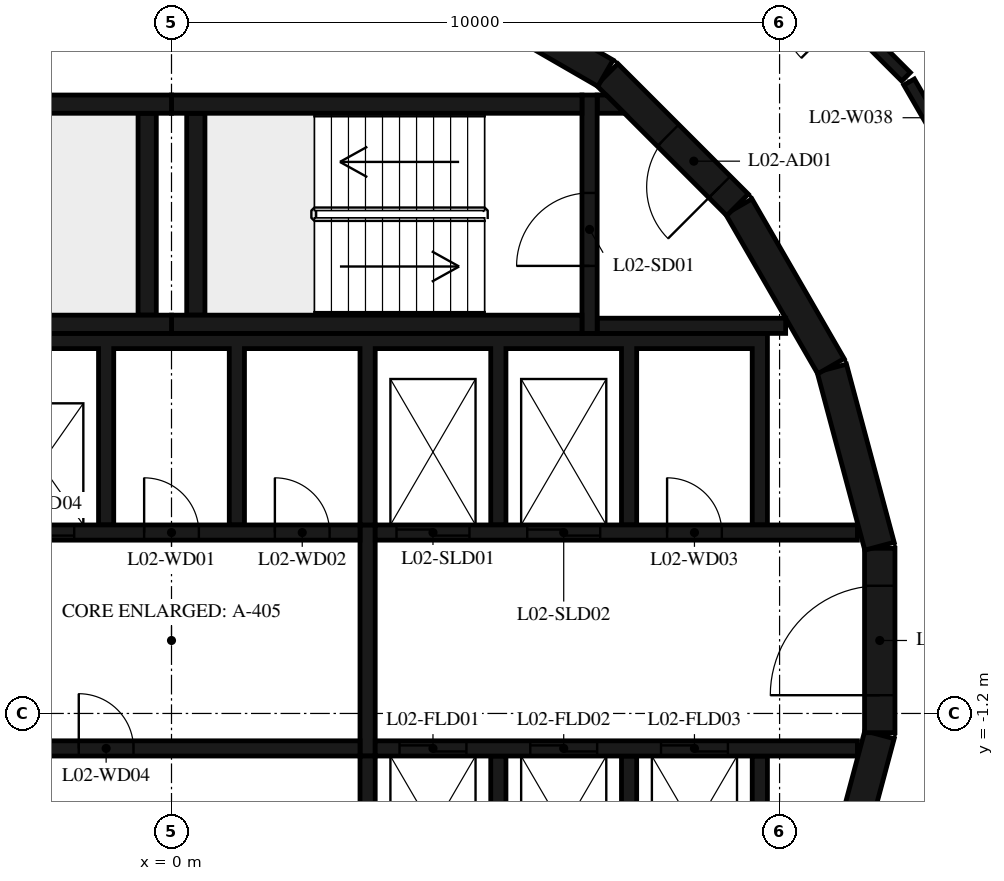
"""IFC4 building model, lengths in metres.
Left out: names, types, materials, properties, quantities, classifications, styles, units other than length and angle.
Written with IfcOpenShell. Run it as: python <this file> out.ifc"""

import sys

from ifc_helpers import new_model, si_unit, direction, frame, frame_2d, origin, place, context, subcontext, project, spatial, polyline, rectangle, outline, extrude, element, fill, save


model = new_model("IFC4")
c1 = context("Model", 3, precision=1e-05, world=origin(), true_north=direction((0.0, 1.0)))
c2 = subcontext(c1, "Body", "Model", "MODEL_VIEW")
j1 = project(units=[si_unit("LENGTHUNIT", "METRE"), si_unit("PLANEANGLEUNIT", "RADIAN")], contexts=[c1])
p1 = place(None, origin())
s1 = spatial("IfcSite", under=j1, at=p1, CompositionType="ELEMENT")
p2 = place(p1, origin())
s2 = spatial("IfcBuilding", under=s1, at=p2, CompositionType="ELEMENT")
p3 = place(p2, frame((0.0, 0.0, 13.8)))
s3 = spatial("IfcBuildingStorey", under=s2, at=p3, CompositionType="ELEMENT", Elevation=13.8)
p4 = place(p3, frame((10.858, -4.479, 0.0), z_axis=(0.0, 0.0, 1.0), x_axis=(0.258734743916, 0.965948410781, 0.0)))
e1 = element("IfcWall", 1, at=p4, inside=s3, PredefinedType="SHEAR", context=c2, shape_type="SweptSolid", body=[
    extrude(rectangle(XDim=3.033, YDim=0.5, at=frame_2d((1.516, 0.0))), origin(), (0.0, 0.0, 1.0), 4.42),
])
p5 = place(p3, frame((11.647, -1.516, 0.0), z_axis=(0.0, 0.0, 1.0), x_axis=(0.0, 1.0, 0.0)))
e2 = element("IfcWall", 2, at=p5, inside=s3, PredefinedType="SHEAR", context=c2, shape_type="SweptSolid", body=[
    extrude(rectangle(XDim=3.033, YDim=0.5, at=frame_2d((1.516, 0.0))), origin(), (0.0, 0.0, 1.0), 4.42),
])
p6 = place(p5, frame((0.616, 0.0, 0.0)))
e3 = element("IfcOpeningElement", 3, at=p6, cuts=e2, PredefinedType="OPENING", context=c2, shape_type="SweptSolid", body=[
    extrude(rectangle(XDim=1.8, YDim=2.1, at=frame_2d((0.9, 1.05))), frame((0.0, 0.26, 0.0), z_axis=(0.0, -1.0, 0.0), x_axis=(1.0, 0.0, 0.0)), (0.0, 0.0, 1.0), 0.52),
])
for number, where, z_axis, x_axis in (
    (4, (11.643, 1.55, 0.0), (0.0, 0.0, 1.0), (-0.259, 0.966, 0.0)),
    (5, (10.845, 4.51, 0.0), (0.0, 0.0, 1.0), (-0.5, 0.866, 0.0)),
):
    element("IfcWall", number, at=place(p3, frame(where, z_axis=z_axis, x_axis=x_axis)), inside=s3, PredefinedType="SHEAR", context=c2, shape_type="SweptSolid", body=[
        extrude(rectangle(XDim=3.033, YDim=0.5, at=frame_2d((1.516, 0.0))), origin(), (0.0, 0.0, 1.0), 4.42),
    ])
p7 = place(p3, frame((9.308, 7.164, 0.0), z_axis=(0.0, 0.0, 1.0), x_axis=(-0.707106781187, 0.707106781187, 0.0)))
e6 = element("IfcWall", 6, at=p7, inside=s3, PredefinedType="SHEAR", context=c2, shape_type="SweptSolid", body=[
    extrude(rectangle(XDim=3.032, YDim=0.5, at=frame_2d((1.516, 0.0))), origin(), (0.0, 0.0, 1.0), 4.42),
])
p8 = place(p7, frame((0.416, 0.0, 0.0)))
e7 = element("IfcOpeningElement", 7, at=p8, cuts=e6, PredefinedType="OPENING", context=c2, shape_type="SweptSolid", body=[
    extrude(rectangle(XDim=1.2, YDim=2.1, at=frame_2d((0.6, 1.05))), frame((0.0, 0.26, 0.0), z_axis=(0.0, -1.0, 0.0), x_axis=(1.0, 0.0, 0.0)), (0.0, 0.0, 1.0), 0.52),
])
p9 = place(p3, frame((7.137, 9.329, 0.0), z_axis=(0.0, 0.0, 1.0), x_axis=(-0.865975092491, 0.500087131594, 0.0)))
e8 = element("IfcWall", 8, at=p9, inside=s3, PredefinedType="SHEAR", context=c2, shape_type="SweptSolid", body=[
    extrude(rectangle(XDim=3.033, YDim=0.5, at=frame_2d((1.516, 0.0))), origin(), (0.0, 0.0, 1.0), 4.42),
])
for number, where, z_axis, x_axis in (
    (9, (0.0, 5.2, 0.0), (0.0, 0.0, 1.0), (1.0, 0.0, 0.0)),
    (10, (0.0, 8.82, 0.0), (0.0, 0.0, 1.0), (1.0, 0.0, 0.0)),
):
    element("IfcWall", number, at=place(p3, frame(where, z_axis=z_axis, x_axis=x_axis)), inside=s3, PredefinedType="SHEAR", context=c2, shape_type="SweptSolid", body=[
        extrude(rectangle(XDim=6.75, YDim=0.3, at=frame_2d((3.375, 0.0))), origin(), (0.0, 0.0, 1.0), 4.42),
    ])
p10 = place(p3, frame((0.4, 5.35, 0.0), z_axis=(0.0, 0.0, 1.0), x_axis=(0.0, 1.0, 0.0)))
e11 = element("IfcWall", 11, at=p10, inside=s3, PredefinedType="SHEAR", context=c2, shape_type="SweptSolid", body=[
    extrude(rectangle(XDim=3.32, YDim=0.3, at=frame_2d((1.66, 0.0))), origin(), (0.0, 0.0, 1.0), 4.42),
])
p11 = place(p3, frame((6.875, 5.05, 0.0), z_axis=(0.0, 0.0, 1.0), x_axis=(0.0, 1.0, 0.0)))
e12 = element("IfcWall", 12, at=p11, inside=s3, PredefinedType="SHEAR", context=c2, shape_type="SweptSolid", body=[
    extrude(rectangle(XDim=3.92, YDim=0.25, at=frame_2d((1.96, 0.0))), origin(), (0.0, 0.0, 1.0), 4.42),
])
p12 = place(p11, frame((1.11, 0.0, 0.0)))
e13 = element("IfcOpeningElement", 13, at=p12, cuts=e12, PredefinedType="OPENING", context=c2, shape_type="SweptSolid", body=[
    extrude(rectangle(XDim=1.2, YDim=2.1, at=frame_2d((0.6, 1.05))), frame((0.0, 0.135, 0.0), z_axis=(0.0, -1.0, 0.0), x_axis=(1.0, 0.0, 0.0)), (0.0, 0.0, 1.0), 0.27),
])
p13 = place(p3, frame((7.0, 5.175, 0.0), z_axis=(0.0, 0.0, 1.0), x_axis=(1.0, 0.0, 0.0)))
e14 = element("IfcWall", 14, at=p13, inside=s3, PredefinedType="SHEAR", context=c2, shape_type="SweptSolid", body=[
    extrude(rectangle(XDim=3.1, YDim=0.25, at=frame_2d((1.55, 0.0))), origin(), (0.0, 0.0, 1.0), 4.42),
])
p14 = place(p3, origin())
e15 = element("IfcWall", 15, at=p14, inside=s3, PredefinedType="SHEAR", context=c2, shape_type="SweptSolid", body=[
    extrude(outline(polyline([(7.448, 8.67), (7.0, 8.67), (7.0, 8.97), (7.148, 8.97), (7.448, 8.67)])), origin(), (0.0, 0.0, 1.0), 4.42),
])
for number, where, z_axis, x_axis in (
    (16, (-6.75, 5.2, 0.0), (0.0, 0.0, 1.0), (1.0, 0.0, 0.0)),
    (17, (-6.75, 8.82, 0.0), (0.0, 0.0, 1.0), (1.0, 0.0, 0.0)),
):
    element("IfcWall", number, at=place(p3, frame(where, z_axis=z_axis, x_axis=x_axis)), inside=s3, PredefinedType="SHEAR", context=c2, shape_type="SweptSolid", body=[
        extrude(rectangle(XDim=6.75, YDim=0.3, at=frame_2d((3.375, 0.0))), origin(), (0.0, 0.0, 1.0), 4.42),
    ])
p15 = place(p3, frame((-0.4, 5.35, 0.0), z_axis=(0.0, 0.0, 1.0), x_axis=(0.0, 1.0, 0.0)))
e18 = element("IfcWall", 18, at=p15, inside=s3, PredefinedType="SHEAR", context=c2, shape_type="SweptSolid", body=[
    extrude(rectangle(XDim=3.32, YDim=0.3, at=frame_2d((1.66, 0.0))), origin(), (0.0, 0.0, 1.0), 4.42),
])
p16 = place(p3, origin())
e19 = element("IfcWall", 19, at=p16, inside=s3, PredefinedType="SHEAR", context=c2, shape_type="SweptSolid", body=[
    extrude(outline(polyline([(-9.55, 4.8), (-7.65, 4.8), (-7.65, 1.9), (-7.4, 1.9), (-7.4, 4.8), (-5.5, 4.8), (-5.5, 1.9), (-5.25, 1.9), (-5.25, 4.8), (-3.35, 4.8), (-3.35, 1.9), (-3.1, 1.9), (-3.1, 4.8), (-1.2, 4.8), (-1.2, 1.9), (-0.95, 1.9), (-0.95, 4.8), (0.95, 4.8), (0.95, 1.9), (1.2, 1.9), (1.2, 4.8), (3.1, 4.8), (3.1, 1.9), (3.35, 1.9), (3.35, 4.8), (5.25, 4.8), (5.25, 1.9), (5.5, 1.9), (5.5, 4.8), (7.4, 4.8), (7.4, 1.9), (7.65, 1.9), (7.65, 4.8), (9.55, 4.8), (9.55, 1.9), (9.8, 1.9), (9.8, 4.8), (9.8, 5.05), (-9.8, 5.05), (-9.8, 4.8), (-9.8, 1.9), (-9.55, 1.9), (-9.55, 4.8)])), origin(), (0.0, 0.0, 1.0), 4.42),
])
p17 = place(p3, origin())
e20 = element("IfcWall", 20, at=p17, inside=s3, PredefinedType="SHEAR", context=c2, shape_type="SweptSolid", body=[
    extrude(outline(polyline([(9.8, -5.05), (9.8, -4.8), (9.8, -1.9), (9.55, -1.9), (9.55, -4.8), (7.65, -4.8), (7.65, -1.9), (7.4, -1.9), (7.4, -4.8), (5.5, -4.8), (5.5, -1.9), (5.25, -1.9), (5.25, -4.8), (3.35, -4.8), (3.35, -1.9), (3.1, -1.9), (3.1, -4.8), (-5.25, -4.8), (-5.25, -1.9), (-5.5, -1.9), (-5.5, -4.8), (-7.4, -4.8), (-7.4, -1.9), (-7.65, -1.9), (-7.65, -4.8), (-9.55, -4.8), (-9.55, -1.9), (-9.8, -1.9), (-9.8, -4.8), (-9.8, -5.05), (9.8, -5.05)])), origin(), (0.0, 0.0, 1.0), 4.42),
])
p18 = place(p3, frame((-11.28, 1.775, 0.0), z_axis=(0.0, 0.0, 1.0), x_axis=(1.0, 0.0, 0.0)))
e21 = element("IfcWall", 21, at=p18, inside=s3, PredefinedType="SHEAR", context=c2, shape_type="SweptSolid", body=[
    extrude(rectangle(XDim=14.38, YDim=0.25, at=frame_2d((7.19, 0.0))), origin(), (0.0, 0.0, 1.0), 4.42),
])
p19 = place(p18, frame((2.13, 0.0, 0.0)))
e22 = element("IfcOpeningElement", 22, at=p19, cuts=e21, PredefinedType="OPENING", context=c2, shape_type="SweptSolid", body=[
    extrude(rectangle(XDim=1.1, YDim=2.1, at=frame_2d((0.55, 1.05))), frame((0.0, 0.135, 0.0), z_axis=(0.0, -1.0, 0.0), x_axis=(1.0, 0.0, 0.0)), (0.0, 0.0, 1.0), 0.27),
])
p20 = place(p18, frame((4.28, 0.0, 0.0)))
e23 = element("IfcOpeningElement", 23, at=p20, cuts=e21, PredefinedType="OPENING", context=c2, shape_type="SweptSolid", body=[
    extrude(rectangle(XDim=1.1, YDim=2.1, at=frame_2d((0.55, 1.05))), frame((0.0, 0.135, 0.0), z_axis=(0.0, -1.0, 0.0), x_axis=(1.0, 0.0, 0.0)), (0.0, 0.0, 1.0), 0.27),
])
p21 = place(p18, frame((6.43, 0.0, 0.0)))
e24 = element("IfcOpeningElement", 24, at=p21, cuts=e21, PredefinedType="OPENING", context=c2, shape_type="SweptSolid", body=[
    extrude(rectangle(XDim=1.1, YDim=2.1, at=frame_2d((0.55, 1.05))), frame((0.0, 0.135, 0.0), z_axis=(0.0, -1.0, 0.0), x_axis=(1.0, 0.0, 0.0)), (0.0, 0.0, 1.0), 0.27),
])
p22 = place(p18, frame((8.58, 0.0, 0.0)))
e25 = element("IfcOpeningElement", 25, at=p22, cuts=e21, PredefinedType="OPENING", context=c2, shape_type="SweptSolid", body=[
    extrude(rectangle(XDim=1.1, YDim=2.1, at=frame_2d((0.55, 1.05))), frame((0.0, 0.135, 0.0), z_axis=(0.0, -1.0, 0.0), x_axis=(1.0, 0.0, 0.0)), (0.0, 0.0, 1.0), 0.27),
])
p23 = place(p18, frame((10.83, 0.0, 0.0)))
e26 = element("IfcOpeningElement", 26, at=p23, cuts=e21, PredefinedType="OPENING", context=c2, shape_type="SweptSolid", body=[
    extrude(rectangle(XDim=0.9, YDim=2.1, at=frame_2d((0.45, 1.05))), frame((0.0, 0.135, 0.0), z_axis=(0.0, -1.0, 0.0), x_axis=(1.0, 0.0, 0.0)), (0.0, 0.0, 1.0), 0.27),
])
p24 = place(p18, frame((12.98, 0.0, 0.0)))
e27 = element("IfcOpeningElement", 27, at=p24, cuts=e21, PredefinedType="OPENING", context=c2, shape_type="SweptSolid", body=[
    extrude(rectangle(XDim=0.9, YDim=2.1, at=frame_2d((0.45, 1.05))), frame((0.0, 0.135, 0.0), z_axis=(0.0, -1.0, 0.0), x_axis=(1.0, 0.0, 0.0)), (0.0, 0.0, 1.0), 0.27),
])
p25 = place(p3, frame((3.35, 1.775, 0.0), z_axis=(0.0, 0.0, 1.0), x_axis=(1.0, 0.0, 0.0)))
e28 = element("IfcWall", 28, at=p25, inside=s3, PredefinedType="SHEAR", context=c2, shape_type="SweptSolid", body=[
    extrude(rectangle(XDim=7.93, YDim=0.25, at=frame_2d((3.965, 0.0))), origin(), (0.0, 0.0, 1.0), 4.42),
])
p26 = place(p25, frame((0.35, 0.0, 0.0)))
e29 = element("IfcOpeningElement", 29, at=p26, cuts=e28, PredefinedType="OPENING", context=c2, shape_type="SweptSolid", body=[
    extrude(rectangle(XDim=1.2, YDim=2.4, at=frame_2d((0.6, 1.2))), frame((0.0, 0.135, 0.0), z_axis=(0.0, -1.0, 0.0), x_axis=(1.0, 0.0, 0.0)), (0.0, 0.0, 1.0), 0.27),
])
p27 = place(p25, frame((2.5, 0.0, 0.0)))
e30 = element("IfcOpeningElement", 30, at=p27, cuts=e28, PredefinedType="OPENING", context=c2, shape_type="SweptSolid", body=[
    extrude(rectangle(XDim=1.2, YDim=2.4, at=frame_2d((0.6, 1.2))), frame((0.0, 0.135, 0.0), z_axis=(0.0, -1.0, 0.0), x_axis=(1.0, 0.0, 0.0)), (0.0, 0.0, 1.0), 0.27),
])
p28 = place(p25, frame((4.8, 0.0, 0.0)))
e31 = element("IfcOpeningElement", 31, at=p28, cuts=e28, PredefinedType="OPENING", context=c2, shape_type="SweptSolid", body=[
    extrude(rectangle(XDim=0.9, YDim=2.1, at=frame_2d((0.45, 1.05))), frame((0.0, 0.135, 0.0), z_axis=(0.0, -1.0, 0.0), x_axis=(1.0, 0.0, 0.0)), (0.0, 0.0, 1.0), 0.27),
])
p29 = place(p3, frame((-11.28, -1.775, 0.0), z_axis=(0.0, 0.0, 1.0), x_axis=(1.0, 0.0, 0.0)))
e32 = element("IfcWall", 32, at=p29, inside=s3, PredefinedType="SHEAR", context=c2, shape_type="SweptSolid", body=[
    extrude(rectangle(XDim=14.38, YDim=0.25, at=frame_2d((7.19, 0.0))), origin(), (0.0, 0.0, 1.0), 4.42),
])
p30 = place(p29, frame((9.755, 0.0, 0.0)))
e33 = element("IfcOpeningElement", 33, at=p30, cuts=e32, PredefinedType="OPENING", context=c2, shape_type="SweptSolid", body=[
    extrude(rectangle(XDim=0.9, YDim=2.1, at=frame_2d((0.45, 1.05))), frame((0.0, 0.135, 0.0), z_axis=(0.0, -1.0, 0.0), x_axis=(1.0, 0.0, 0.0)), (0.0, 0.0, 1.0), 0.27),
])
p31 = place(p3, frame((3.35, -1.775, 0.0), z_axis=(0.0, 0.0, 1.0), x_axis=(1.0, 0.0, 0.0)))
e34 = element("IfcWall", 34, at=p31, inside=s3, PredefinedType="SHEAR", context=c2, shape_type="SweptSolid", body=[
    extrude(rectangle(XDim=7.93, YDim=0.25, at=frame_2d((3.965, 0.0))), origin(), (0.0, 0.0, 1.0), 4.42),
])
p32 = place(p31, frame((0.4, 0.0, 0.0)))
e35 = element("IfcOpeningElement", 35, at=p32, cuts=e34, PredefinedType="OPENING", context=c2, shape_type="SweptSolid", body=[
    extrude(rectangle(XDim=1.1, YDim=2.4, at=frame_2d((0.55, 1.2))), frame((0.0, 0.135, 0.0), z_axis=(0.0, -1.0, 0.0), x_axis=(1.0, 0.0, 0.0)), (0.0, 0.0, 1.0), 0.27),
])
p33 = place(p31, frame((2.55, 0.0, 0.0)))
e36 = element("IfcOpeningElement", 36, at=p33, cuts=e34, PredefinedType="OPENING", context=c2, shape_type="SweptSolid", body=[
    extrude(rectangle(XDim=1.1, YDim=2.4, at=frame_2d((0.55, 1.2))), frame((0.0, 0.135, 0.0), z_axis=(0.0, -1.0, 0.0), x_axis=(1.0, 0.0, 0.0)), (0.0, 0.0, 1.0), 0.27),
])
p34 = place(p31, frame((4.7, 0.0, 0.0)))
e37 = element("IfcOpeningElement", 37, at=p34, cuts=e34, PredefinedType="OPENING", context=c2, shape_type="SweptSolid", body=[
    extrude(rectangle(XDim=1.1, YDim=2.4, at=frame_2d((0.55, 1.2))), frame((0.0, 0.135, 0.0), z_axis=(0.0, -1.0, 0.0), x_axis=(1.0, 0.0, 0.0)), (0.0, 0.0, 1.0), 0.27),
])
p35 = place(p3, frame((3.225, -1.9, 0.0), z_axis=(0.0, 0.0, 1.0), x_axis=(0.0, 1.0, 0.0)))
e38 = element("IfcWall", 38, at=p35, inside=s3, PredefinedType="SHEAR", context=c2, shape_type="SweptSolid", body=[
    extrude(rectangle(XDim=3.8, YDim=0.25, at=frame_2d((1.9, 0.0))), origin(), (0.0, 0.0, 1.0), 4.42),
])
p36 = place(p3, frame((12.08, 9.27, 0.0), z_axis=(0.0, 0.0, 1.0), x_axis=(-0.707106781187, 0.707106781187, 0.0)))
e39 = element("IfcWall", 39, at=p36, inside=s3, PredefinedType="PARTITIONING", context=c2, shape_type="SweptSolid", body=[
    extrude(rectangle(XDim=3.874, YDim=0.2, at=frame_2d((1.937, 0.0))), origin(), (0.0, 0.0, 1.0), 4.42),
])
p37 = place(p36, frame((1.437, 0.0, 0.0)))
e40 = element("IfcOpeningElement", 40, at=p37, cuts=e39, PredefinedType="OPENING", context=c2, shape_type="SweptSolid", body=[
    extrude(rectangle(XDim=1.0, YDim=2.1, at=frame_2d((0.5, 1.05))), frame((0.0, 0.11, 0.0), z_axis=(0.0, -1.0, 0.0), x_axis=(1.0, 0.0, 0.0)), (0.0, 0.0, 1.0), 0.22),
])
p38 = place(p3, frame((12.81, 8.01, 0.0), z_axis=(0.0, 0.0, 1.0), x_axis=(-0.501305875941, 0.865270142064, 0.0)))
e41 = element("IfcWall", 41, at=p38, inside=s3, PredefinedType="PARTITIONING", context=c2, shape_type="SweptSolid", body=[
    extrude(rectangle(XDim=1.356, YDim=0.2, at=frame_2d((0.678, 0.0))), origin(), (0.0, 0.0, 1.0), 4.42),
])
p39 = place(p12, origin())
e42 = element("IfcDoor", 42, at=p39, inside=s3, OperationType="SINGLE_SWING_LEFT", PredefinedType="DOOR", context=c2, shape_type="SweptSolid", body=[
    extrude(rectangle(XDim=1.2, YDim=2.1, at=frame_2d((0.6, 1.05))), frame((0.0, 0.025, 0.0), z_axis=(0.0, -1.0, 0.0), x_axis=(1.0, 0.0, 0.0)), (0.0, 0.0, 1.0), 0.05),
])
fill(e13, e42)
p40 = place(p8, origin())
e43 = element("IfcDoor", 43, at=p40, inside=s3, OperationType="SINGLE_SWING_RIGHT", PredefinedType="DOOR", context=c2, shape_type="SweptSolid", body=[
    extrude(rectangle(XDim=1.2, YDim=2.1, at=frame_2d((0.6, 1.05))), frame((0.0, 0.025, 0.0), z_axis=(0.0, -1.0, 0.0), x_axis=(1.0, 0.0, 0.0)), (0.0, 0.0, 1.0), 0.05),
])
fill(e7, e43)
p41 = place(p6, origin())
e44 = element("IfcDoor", 44, at=p41, inside=s3, OperationType="DOUBLE_DOOR_SINGLE_SWING", PredefinedType="DOOR", context=c2, shape_type="SweptSolid", body=[
    extrude(rectangle(XDim=1.8, YDim=2.1, at=frame_2d((0.9, 1.05))), frame((0.0, 0.025, 0.0), z_axis=(0.0, -1.0, 0.0), x_axis=(1.0, 0.0, 0.0)), (0.0, 0.0, 1.0), 0.05),
])
fill(e3, e44)
p42 = place(p22, origin())
e45 = element("IfcDoor", 45, at=p42, inside=s3, OperationType="DOUBLE_DOOR_SLIDING", PredefinedType="DOOR", context=c2, shape_type="SweptSolid", body=[
    extrude(rectangle(XDim=1.1, YDim=2.1, at=frame_2d((0.55, 1.05))), frame((0.0, 0.025, 0.0), z_axis=(0.0, -1.0, 0.0), x_axis=(1.0, 0.0, 0.0)), (0.0, 0.0, 1.0), 0.05),
])
fill(e25, e45)
p43 = place(p26, origin())
e46 = element("IfcDoor", 46, at=p43, inside=s3, OperationType="DOUBLE_DOOR_SLIDING", PredefinedType="DOOR", context=c2, shape_type="SweptSolid", body=[
    extrude(rectangle(XDim=1.2, YDim=2.4, at=frame_2d((0.6, 1.2))), frame((0.0, 0.025, 0.0), z_axis=(0.0, -1.0, 0.0), x_axis=(1.0, 0.0, 0.0)), (0.0, 0.0, 1.0), 0.05),
])
fill(e29, e46)
p44 = place(p27, origin())
e47 = element("IfcDoor", 47, at=p44, inside=s3, OperationType="DOUBLE_DOOR_SLIDING", PredefinedType="DOOR", context=c2, shape_type="SweptSolid", body=[
    extrude(rectangle(XDim=1.2, YDim=2.4, at=frame_2d((0.6, 1.2))), frame((0.0, 0.025, 0.0), z_axis=(0.0, -1.0, 0.0), x_axis=(1.0, 0.0, 0.0)), (0.0, 0.0, 1.0), 0.05),
])
fill(e30, e47)
p45 = place(p32, origin())
e48 = element("IfcDoor", 48, at=p45, inside=s3, OperationType="DOUBLE_DOOR_SLIDING", PredefinedType="DOOR", context=c2, shape_type="SweptSolid", body=[
    extrude(rectangle(XDim=1.1, YDim=2.4, at=frame_2d((0.55, 1.2))), frame((0.0, 0.025, 0.0), z_axis=(0.0, -1.0, 0.0), x_axis=(1.0, 0.0, 0.0)), (0.0, 0.0, 1.0), 0.05),
])
fill(e35, e48)
p46 = place(p33, origin())
e49 = element("IfcDoor", 49, at=p46, inside=s3, OperationType="DOUBLE_DOOR_SLIDING", PredefinedType="DOOR", context=c2, shape_type="SweptSolid", body=[
    extrude(rectangle(XDim=1.1, YDim=2.4, at=frame_2d((0.55, 1.2))), frame((0.0, 0.025, 0.0), z_axis=(0.0, -1.0, 0.0), x_axis=(1.0, 0.0, 0.0)), (0.0, 0.0, 1.0), 0.05),
])
fill(e36, e49)
p47 = place(p34, origin())
e50 = element("IfcDoor", 50, at=p47, inside=s3, OperationType="DOUBLE_DOOR_SLIDING", PredefinedType="DOOR", context=c2, shape_type="SweptSolid", body=[
    extrude(rectangle(XDim=1.1, YDim=2.4, at=frame_2d((0.55, 1.2))), frame((0.0, 0.025, 0.0), z_axis=(0.0, -1.0, 0.0), x_axis=(1.0, 0.0, 0.0)), (0.0, 0.0, 1.0), 0.05),
])
fill(e37, e50)
p48 = place(p23, origin())
e51 = element("IfcDoor", 51, at=p48, inside=s3, OperationType="SINGLE_SWING_RIGHT", PredefinedType="DOOR", context=c2, shape_type="SweptSolid", body=[
    extrude(rectangle(XDim=0.9, YDim=2.1, at=frame_2d((0.45, 1.05))), frame((0.0, 0.025, 0.0), z_axis=(0.0, -1.0, 0.0), x_axis=(1.0, 0.0, 0.0)), (0.0, 0.0, 1.0), 0.05),
])
fill(e26, e51)
p49 = place(p24, origin())
e52 = element("IfcDoor", 52, at=p49, inside=s3, OperationType="SINGLE_SWING_LEFT", PredefinedType="DOOR", context=c2, shape_type="SweptSolid", body=[
    extrude(rectangle(XDim=0.9, YDim=2.1, at=frame_2d((0.45, 1.05))), frame((0.0, 0.025, 0.0), z_axis=(0.0, -1.0, 0.0), x_axis=(1.0, 0.0, 0.0)), (0.0, 0.0, 1.0), 0.05),
])
fill(e27, e52)
p50 = place(p28, origin())
e53 = element("IfcDoor", 53, at=p50, inside=s3, OperationType="SINGLE_SWING_RIGHT", PredefinedType="DOOR", context=c2, shape_type="SweptSolid", body=[
    extrude(rectangle(XDim=0.9, YDim=2.1, at=frame_2d((0.45, 1.05))), frame((0.0, 0.025, 0.0), z_axis=(0.0, -1.0, 0.0), x_axis=(1.0, 0.0, 0.0)), (0.0, 0.0, 1.0), 0.05),
])
fill(e31, e53)
p51 = place(p30, origin())
e54 = element("IfcDoor", 54, at=p51, inside=s3, OperationType="SINGLE_SWING_LEFT", PredefinedType="DOOR", context=c2, shape_type="SweptSolid", body=[
    extrude(rectangle(XDim=0.9, YDim=2.1, at=frame_2d((0.45, 1.05))), frame((0.0, 0.025, 0.0), z_axis=(0.0, -1.0, 0.0), x_axis=(1.0, 0.0, 0.0)), (0.0, 0.0, 1.0), 0.05),
])
fill(e33, e54)
save(model, sys.argv[1])
